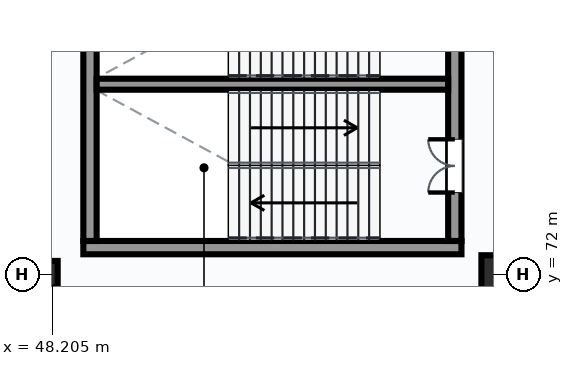
"""IFC4 building model, lengths in metres.
Left out: names, types, materials, properties, quantities, classifications, styles, units other than length and angle.
Written with IfcOpenShell. Run it as: python <this file> out.ifc"""

import sys

from ifc_helpers import new_model, si_unit, direction, frame, frame_2d, origin, origin_2d, place, context, subcontext, project, spatial, rectangle, circle, extrude, element, fill, save


model = new_model("IFC4")
c1 = context("Model", 3, precision=1e-05, world=origin(), true_north=direction((0.0, 1.0)))
c2 = subcontext(c1, "Body", "Model", "MODEL_VIEW")
j1 = project(units=[si_unit("LENGTHUNIT", "METRE"), si_unit("PLANEANGLEUNIT", "RADIAN")], contexts=[c1])
p1 = place(None, origin())
s1 = spatial("IfcSite", under=j1, at=p1, CompositionType="ELEMENT")
p2 = place(p1, origin())
s2 = spatial("IfcBuilding", under=s1, at=p2, CompositionType="ELEMENT")
p3 = place(p2, frame((0.0, 0.0, 10.2)))
s3 = spatial("IfcBuildingStorey", under=s2, at=p3, CompositionType="ELEMENT", Elevation=10.2)
p4 = place(p3, frame((48.0, 72.0, 0.0), z_axis=(0.0, 0.0, 1.0), x_axis=(1.0, 0.0, 0.0)))
e1 = element("IfcColumn", 1, at=p4, inside=s3, PredefinedType="COLUMN", context=c2, shape_type="SweptSolid", body=[
    extrude(circle(Radius=0.35, at=origin_2d()), origin(), (0.0, 0.0, 1.0), 4.5),
])
p5 = place(p3, frame((60.0, 72.0, 0.0), z_axis=(0.0, 0.0, 1.0), x_axis=(1.0, 0.0, 0.0)))
e2 = element("IfcColumn", 2, at=p5, inside=s3, PredefinedType="COLUMN", context=c2, shape_type="SweptSolid", body=[
    extrude(rectangle(XDim=1.0, YDim=1.0, at=origin_2d()), origin(), (0.0, 0.0, 1.0), 4.5),
])
p6 = place(p3, frame((49.025, 72.7, 0.0), z_axis=(0.0, 0.0, 1.0), x_axis=(1.0, 0.0, 0.0)))
e3 = element("IfcWall", 3, at=p6, inside=s3, PredefinedType="SHEAR", context=c2, shape_type="SweptSolid", body=[
    extrude(rectangle(XDim=9.95, YDim=0.35, at=frame_2d((4.975, 0.0))), origin(), (0.0, 0.0, 1.0), 4.5),
])
p7 = place(p3, frame((49.2, 72.875, 0.0), z_axis=(0.0, 0.0, 1.0), x_axis=(0.0, 1.0, 0.0)))
e4 = element("IfcWall", 4, at=p7, inside=s3, PredefinedType="SHEAR", context=c2, shape_type="SweptSolid", body=[
    extrude(rectangle(XDim=8.25, YDim=0.35, at=frame_2d((4.125, 0.0))), origin(), (0.0, 0.0, 1.0), 4.5),
])
p8 = place(p3, frame((58.8, 72.875, 0.0), z_axis=(0.0, 0.0, 1.0), x_axis=(0.0, 1.0, 0.0)))
e5 = element("IfcWall", 5, at=p8, inside=s3, PredefinedType="SHEAR", context=c2, shape_type="SweptSolid", body=[
    extrude(rectangle(XDim=8.25, YDim=0.35, at=frame_2d((4.125, 0.0))), origin(), (0.0, 0.0, 1.0), 4.5),
])
p9 = place(p8, frame((1.275, 0.0, 0.0)))
e6 = element("IfcOpeningElement", 6, at=p9, cuts=e5, PredefinedType="OPENING", context=c2, shape_type="SweptSolid", body=[
    extrude(rectangle(XDim=1.4, YDim=2.2, at=frame_2d((0.7, 1.1))), frame((0.0, 0.185, 0.0), z_axis=(0.0, -1.0, 0.0), x_axis=(1.0, 0.0, 0.0)), (0.0, 0.0, 1.0), 0.37),
])
p10 = place(p8, frame((5.615, 0.0, 0.0)))
e7 = element("IfcOpeningElement", 7, at=p10, cuts=e5, PredefinedType="OPENING", context=c2, shape_type="SweptSolid", body=[
    extrude(rectangle(XDim=1.32, YDim=2.2, at=frame_2d((0.66, 1.1))), frame((0.0, 0.185, 0.0), z_axis=(0.0, -1.0, 0.0), x_axis=(1.0, 0.0, 0.0)), (0.0, 0.0, 1.0), 0.37),
])
p11 = place(p3, frame((49.375, 77.0, 0.0), z_axis=(0.0, 0.0, 1.0), x_axis=(1.0, 0.0, 0.0)))
e8 = element("IfcWall", 8, at=p11, inside=s3, PredefinedType="SHEAR", context=c2, shape_type="SweptSolid", body=[
    extrude(rectangle(XDim=9.25, YDim=0.29, at=frame_2d((4.625, 0.0))), origin(), (0.0, 0.0, 1.0), 4.5),
])
p12 = place(p9, origin())
e9 = element("IfcDoor", 9, at=p12, inside=s3, OperationType="DOUBLE_DOOR_SINGLE_SWING", PredefinedType="DOOR", context=c2, shape_type="SweptSolid", body=[
    extrude(rectangle(XDim=1.4, YDim=2.2, at=frame_2d((0.7, 1.1))), frame((0.0, 0.025, 0.0), z_axis=(0.0, -1.0, 0.0), x_axis=(1.0, 0.0, 0.0)), (0.0, 0.0, 1.0), 0.05),
])
fill(e6, e9)
save(model, sys.argv[1])
